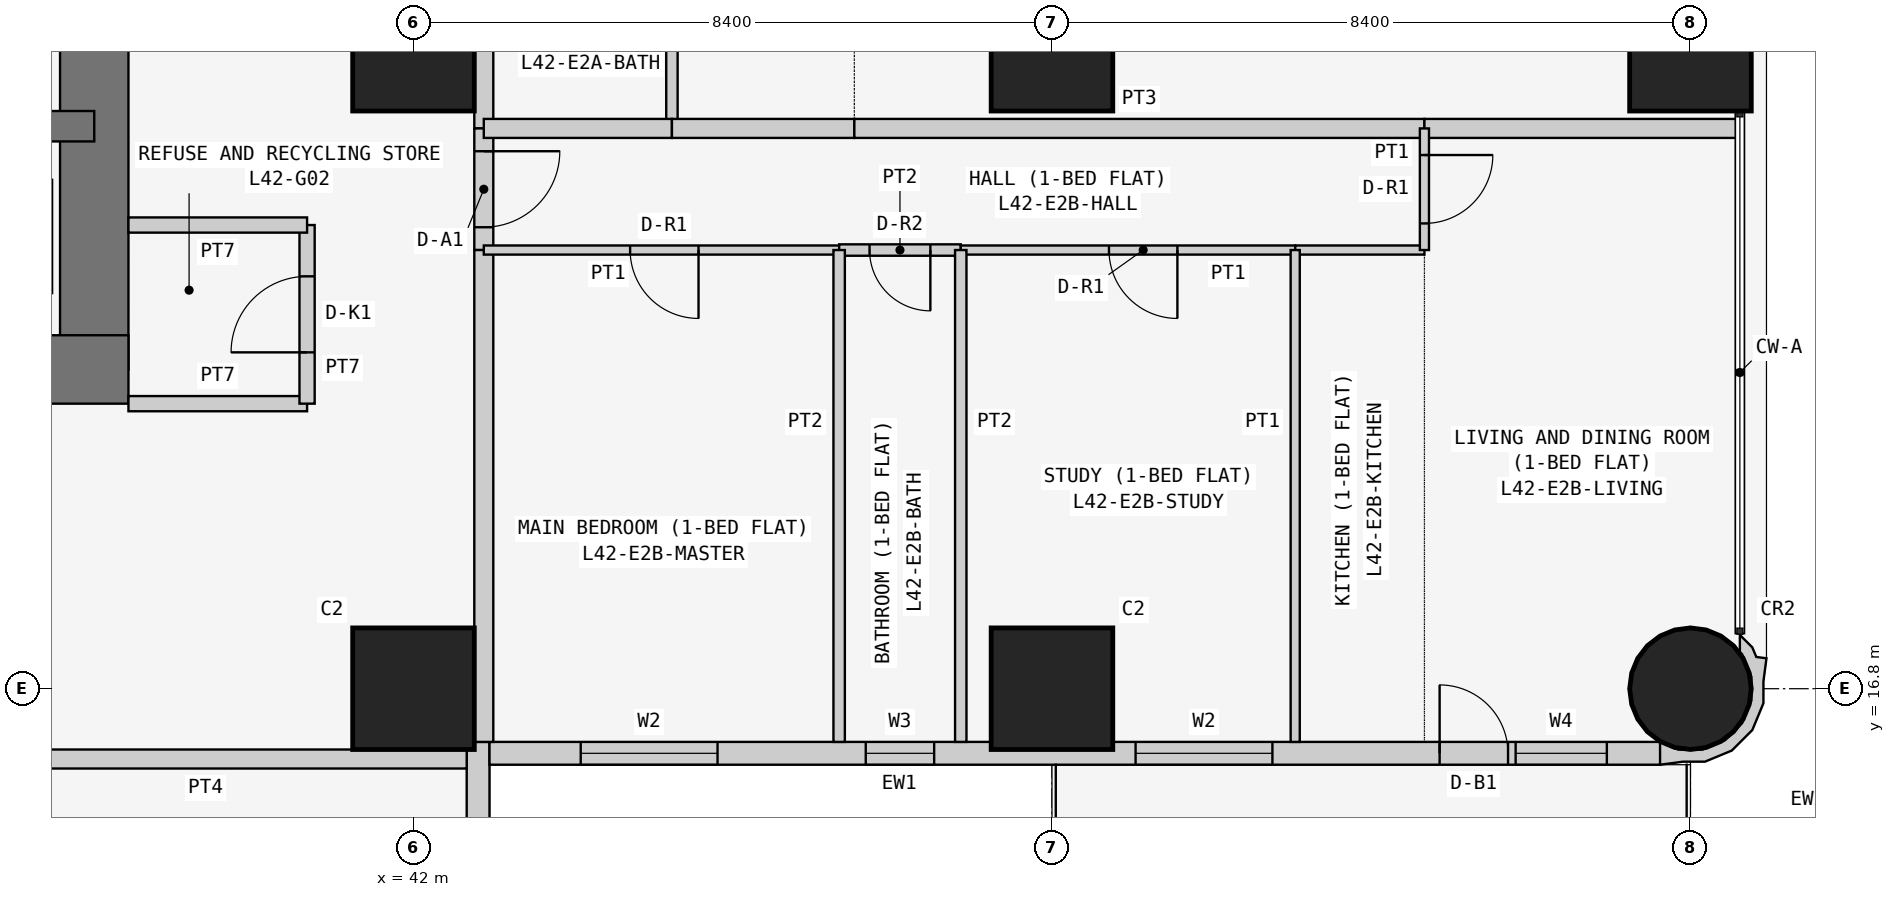
"""IFC4 building model, lengths in metres.
Left out: names, types, materials, properties, quantities, classifications, styles, units other than length and angle.
Written with IfcOpenShell. Run it as: python <this file> out.ifc"""

import sys

from ifc_helpers import new_model, si_unit, direction, frame, frame_2d, origin, origin_2d, place, context, subcontext, project, spatial, polyline, rectangle, circle, outline, extrude, element, fill, save


model = new_model("IFC4")
c1 = context("Model", 3, precision=1e-05, world=origin(), true_north=direction((0.0, 1.0)))
c2 = subcontext(c1, "Body", "Model", "MODEL_VIEW")
j1 = project(units=[si_unit("LENGTHUNIT", "METRE"), si_unit("PLANEANGLEUNIT", "RADIAN")], contexts=[c1])
p1 = place(None, origin())
s1 = spatial("IfcSite", under=j1, at=p1, CompositionType="ELEMENT")
p2 = place(p1, origin())
s2 = spatial("IfcBuilding", under=s1, at=p2, CompositionType="ELEMENT")
p3 = place(p2, frame((0.0, 0.0, 162.9)))
s3 = spatial("IfcBuildingStorey", under=s2, at=p3, CompositionType="ELEMENT", Elevation=162.9)
for number, where, z_axis, x_axis in (
    (1, (42.0, 16.8, 0.0), (0.0, 0.0, 1.0), (1.0, 0.0, 0.0)),
    (2, (42.0, 25.2, 0.0), (0.0, 0.0, 1.0), (1.0, 0.0, 0.0)),
    (3, (50.4, 16.8, 0.0), (0.0, 0.0, 1.0), (1.0, 0.0, 0.0)),
    (4, (50.4, 25.2, 0.0), (0.0, 0.0, 1.0), (1.0, 0.0, 0.0)),
):
    element("IfcColumn", number, at=place(p3, frame(where, z_axis=z_axis, x_axis=x_axis)), inside=s3, PredefinedType="COLUMN", context=c2, shape_type="SweptSolid", body=[
        extrude(rectangle(XDim=1.6, YDim=1.6, at=origin_2d()), origin(), (0.0, 0.0, 1.0), 3.6),
    ])
p4 = place(p3, frame((58.8, 16.8, 0.0), z_axis=(0.0, 0.0, 1.0), x_axis=(1.0, 0.0, 0.0)))
e5 = element("IfcColumn", 5, at=p4, inside=s3, PredefinedType="COLUMN", context=c2, shape_type="SweptSolid", body=[
    extrude(circle(Radius=0.8, at=origin_2d()), origin(), (0.0, 0.0, 1.0), 3.6),
])
p5 = place(p3, frame((58.8, 25.2, 0.0), z_axis=(0.0, 0.0, 1.0), x_axis=(1.0, 0.0, 0.0)))
e6 = element("IfcColumn", 6, at=p5, inside=s3, PredefinedType="COLUMN", context=c2, shape_type="SweptSolid", body=[
    extrude(rectangle(XDim=1.6, YDim=1.6, at=origin_2d()), origin(), (0.0, 0.0, 1.0), 3.6),
])
p6 = place(p3, frame((21.0, 21.0, 0.0), z_axis=(0.0, 0.0, 1.0), x_axis=(1.0, 0.0, 0.0)))
e7 = element("IfcWall", 7, at=p6, inside=s3, PredefinedType="SHEAR", context=c2, shape_type="SweptSolid", body=[
    extrude(rectangle(XDim=17.25, YDim=0.9, at=frame_2d((8.625, 0.0))), origin(), (0.0, 0.0, 1.0), 3.6),
])
p7 = place(p3, frame((37.8, 21.0, 0.0), z_axis=(0.0, 0.0, 1.0), x_axis=(0.0, 1.0, 0.0)))
e8 = element("IfcWall", 8, at=p7, inside=s3, PredefinedType="SHEAR", context=c2, shape_type="SweptSolid", body=[
    extrude(rectangle(XDim=17.25, YDim=0.9, at=frame_2d((8.625, 0.0))), origin(), (0.0, 0.0, 1.0), 3.6),
])
p8 = place(p7, frame((5.2, 0.0, 0.0)))
e9 = element("IfcOpeningElement", 9, at=p8, cuts=e8, PredefinedType="OPENING", context=c2, shape_type="SweptSolid", body=[
    extrude(rectangle(XDim=1.2, YDim=2.1, at=frame_2d((0.6, 1.05))), frame((0.0, 0.46, 0.0), z_axis=(0.0, -1.0, 0.0), x_axis=(1.0, 0.0, 0.0)), (0.0, 0.0, 1.0), 0.92),
])
p9 = place(p3, frame((26.6, 24.2, 0.0), z_axis=(0.0, 0.0, 1.0), x_axis=(1.0, 0.0, 0.0)))
e10 = element("IfcWall", 10, at=p9, inside=s3, PredefinedType="SHEAR", context=c2, shape_type="SweptSolid", body=[
    extrude(rectangle(XDim=11.2, YDim=0.4, at=frame_2d((5.6, 0.0))), origin(), (0.0, 0.0, 1.0), 3.6),
])
p10 = place(p9, frame((0.85, 0.0, 0.0)))
e11 = element("IfcOpeningElement", 11, at=p10, cuts=e10, PredefinedType="OPENING", context=c2, shape_type="SweptSolid", body=[
    extrude(rectangle(XDim=1.1, YDim=2.1, at=frame_2d((0.55, 1.05))), frame((0.0, 0.21, 0.0), z_axis=(0.0, -1.0, 0.0), x_axis=(1.0, 0.0, 0.0)), (0.0, 0.0, 1.0), 0.42),
])
p11 = place(p9, frame((3.65, 0.0, 0.0)))
e12 = element("IfcOpeningElement", 12, at=p11, cuts=e10, PredefinedType="OPENING", context=c2, shape_type="SweptSolid", body=[
    extrude(rectangle(XDim=1.1, YDim=2.1, at=frame_2d((0.55, 1.05))), frame((0.0, 0.21, 0.0), z_axis=(0.0, -1.0, 0.0), x_axis=(1.0, 0.0, 0.0)), (0.0, 0.0, 1.0), 0.42),
])
p12 = place(p3, frame((42.85, 8.8, 0.0), z_axis=(0.0, 0.0, 1.0), x_axis=(0.0, 1.0, 0.0)))
e13 = element("IfcWall", 13, at=p12, inside=s3, PredefinedType="SOLIDWALL", context=c2, shape_type="SweptSolid", body=[
    extrude(rectangle(XDim=7.3, YDim=0.3, at=frame_2d((3.65, 0.0))), origin(), (0.0, 0.0, 1.0), 3.45),
])
p13 = place(p12, frame((3.1, 0.0, 0.9)))
e14 = element("IfcOpeningElement", 14, at=p13, cuts=e13, PredefinedType="OPENING", context=c2, shape_type="SweptSolid", body=[
    extrude(rectangle(XDim=2.4, YDim=1.5, at=frame_2d((1.2, 0.75))), frame((0.0, 0.16, 0.0), z_axis=(0.0, -1.0, 0.0), x_axis=(1.0, 0.0, 0.0)), (0.0, 0.0, 1.0), 0.32),
])
p14 = place(p12, frame((0.75, 0.0, 0.9)))
e15 = element("IfcOpeningElement", 15, at=p14, cuts=e13, PredefinedType="OPENING", context=c2, shape_type="SweptSolid", body=[
    extrude(rectangle(XDim=1.2, YDim=1.5, at=frame_2d((0.6, 0.75))), frame((0.0, 0.16, 0.0), z_axis=(0.0, -1.0, 0.0), x_axis=(1.0, 0.0, 0.0)), (0.0, 0.0, 1.0), 0.32),
])
p15 = place(p3, frame((43.0, 15.95, 0.0), z_axis=(0.0, 0.0, 1.0), x_axis=(1.0, 0.0, 0.0)))
e16 = element("IfcWall", 16, at=p15, inside=s3, PredefinedType="SOLIDWALL", context=c2, shape_type="SweptSolid", body=[
    extrude(rectangle(XDim=15.4, YDim=0.3, at=frame_2d((7.7, 0.0))), origin(), (0.0, 0.0, 1.0), 3.45),
])
p16 = place(p15, frame((1.2, 0.0, 0.9)))
e17 = element("IfcOpeningElement", 17, at=p16, cuts=e16, PredefinedType="OPENING", context=c2, shape_type="SweptSolid", body=[
    extrude(rectangle(XDim=1.8, YDim=1.5, at=frame_2d((0.9, 0.75))), frame((0.0, 0.16, 0.0), z_axis=(0.0, -1.0, 0.0), x_axis=(1.0, 0.0, 0.0)), (0.0, 0.0, 1.0), 0.32),
])
p17 = place(p15, frame((4.95, 0.0, 1.5)))
e18 = element("IfcOpeningElement", 18, at=p17, cuts=e16, PredefinedType="OPENING", context=c2, shape_type="SweptSolid", body=[
    extrude(rectangle(XDim=0.9, YDim=0.7, at=frame_2d((0.45, 0.35))), frame((0.0, 0.16, 0.0), z_axis=(0.0, -1.0, 0.0), x_axis=(1.0, 0.0, 0.0)), (0.0, 0.0, 1.0), 0.32),
])
p18 = place(p15, frame((8.5, 0.0, 0.9)))
e19 = element("IfcOpeningElement", 19, at=p18, cuts=e16, PredefinedType="OPENING", context=c2, shape_type="SweptSolid", body=[
    extrude(rectangle(XDim=1.8, YDim=1.5, at=frame_2d((0.9, 0.75))), frame((0.0, 0.16, 0.0), z_axis=(0.0, -1.0, 0.0), x_axis=(1.0, 0.0, 0.0)), (0.0, 0.0, 1.0), 0.32),
])
p19 = place(p15, frame((12.5, 0.0, 0.0)))
e20 = element("IfcOpeningElement", 20, at=p19, cuts=e16, PredefinedType="OPENING", context=c2, shape_type="SweptSolid", body=[
    extrude(rectangle(XDim=0.9, YDim=2.4, at=frame_2d((0.45, 1.2))), frame((0.0, 0.16, 0.0), z_axis=(0.0, -1.0, 0.0), x_axis=(1.0, 0.0, 0.0)), (0.0, 0.0, 1.0), 0.32),
])
p20 = place(p15, frame((13.5, 0.0, 0.9)))
e21 = element("IfcOpeningElement", 21, at=p20, cuts=e16, PredefinedType="OPENING", context=c2, shape_type="SweptSolid", body=[
    extrude(rectangle(XDim=1.2, YDim=1.5, at=frame_2d((0.6, 0.75))), frame((0.0, 0.16, 0.0), z_axis=(0.0, -1.0, 0.0), x_axis=(1.0, 0.0, 0.0)), (0.0, 0.0, 1.0), 0.32),
])
p21 = place(p3, frame((58.473, 15.983, 0.0), z_axis=(0.0, 0.0, 1.0), x_axis=(0.93923434088, -0.343276641956, 0.0)))
e22 = element("IfcWall", 22, at=p21, inside=s3, PredefinedType="SOLIDWALL", context=c2, shape_type="SweptSolid", body=[
    extrude(outline(polyline([(0.828, 1.599), (0.697, 1.569), (0.604, 1.67), (0.394, 1.767), (0.471, 1.556), (0.508, 1.539), (0.724, 1.304), (0.834, 1.005), (0.82, 0.686), (0.686, 0.397), (0.451, 0.182), (0.152, 0.073), (-0.116, 0.084), (-0.127, 0.078), (-0.146, 0.071), (-0.006, -0.197), (0.266, -0.055), (0.535, 0.044), (0.817, 0.302), (0.978, 0.648), (0.994, 1.03), (0.895, 1.3), (0.828, 1.599)])), origin(), (0.0, 0.0, 1.0), 3.45),
])
p22 = place(p3, frame((38.25, 20.55, 0.0), z_axis=(0.0, 0.0, 1.0), x_axis=(1.0, 0.0, 0.0)))
e23 = element("IfcWall", 23, at=p22, inside=s3, PredefinedType="PARTITIONING", context=c2, shape_type="SweptSolid", body=[
    extrude(rectangle(XDim=2.35, YDim=0.2, at=frame_2d((1.175, 0.0))), origin(), (0.0, 0.0, 1.0), 3.45),
])
p23 = place(p3, frame((40.6, 20.55, 0.0), z_axis=(0.0, 0.0, 1.0), x_axis=(0.0, 1.0, 0.0)))
e24 = element("IfcWall", 24, at=p23, inside=s3, PredefinedType="PARTITIONING", context=c2, shape_type="SweptSolid", body=[
    extrude(rectangle(XDim=2.35, YDim=0.2, at=frame_2d((1.175, 0.0))), origin(), (0.0, 0.0, 1.0), 3.45),
])
p24 = place(p23, frame((0.675, 0.0, 0.0)))
e25 = element("IfcOpeningElement", 25, at=p24, cuts=e24, PredefinedType="OPENING", context=c2, shape_type="SweptSolid", body=[
    extrude(rectangle(XDim=1.0, YDim=2.1, at=frame_2d((0.5, 1.05))), frame((0.0, 0.11, 0.0), z_axis=(0.0, -1.0, 0.0), x_axis=(1.0, 0.0, 0.0)), (0.0, 0.0, 1.0), 0.22),
])
p25 = place(p3, frame((40.6, 22.9, 0.0), z_axis=(0.0, 0.0, 1.0), x_axis=(-1.0, 0.0, 0.0)))
e26 = element("IfcWall", 26, at=p25, inside=s3, PredefinedType="PARTITIONING", context=c2, shape_type="SweptSolid", body=[
    extrude(rectangle(XDim=2.35, YDim=0.2, at=frame_2d((1.175, 0.0))), origin(), (0.0, 0.0, 1.0), 3.45),
])
p26 = place(p3, frame((42.925, 26.8, 0.0), z_axis=(0.0, 0.0, 1.0), x_axis=(0.0, -1.0, 0.0)))
e27 = element("IfcWall", 27, at=p26, inside=s3, PredefinedType="PARTITIONING", context=c2, shape_type="SweptSolid", body=[
    extrude(rectangle(XDim=2.629, YDim=0.25, at=frame_2d((1.314, 0.0))), origin(), (0.0, 0.0, 1.0), 3.45),
])
p27 = place(p3, frame((42.925, 24.171, 0.0), z_axis=(0.0, 0.0, 1.0), x_axis=(0.0, -1.0, 0.0)))
e28 = element("IfcWall", 28, at=p27, inside=s3, PredefinedType="PARTITIONING", context=c2, shape_type="SweptSolid", body=[
    extrude(rectangle(XDim=1.6, YDim=0.25, at=frame_2d((0.8, 0.0))), origin(), (0.0, 0.0, 1.0), 3.45),
])
p28 = place(p27, frame((0.3, 0.0, 0.0)))
e29 = element("IfcOpeningElement", 29, at=p28, cuts=e28, PredefinedType="OPENING", context=c2, shape_type="SweptSolid", body=[
    extrude(rectangle(XDim=1.0, YDim=2.1, at=frame_2d((0.5, 1.05))), frame((0.0, 0.135, 0.0), z_axis=(0.0, -1.0, 0.0), x_axis=(1.0, 0.0, 0.0)), (0.0, 0.0, 1.0), 0.27),
])
p29 = place(p3, frame((42.925, 22.571, 0.0), z_axis=(0.0, 0.0, 1.0), x_axis=(0.0, -1.0, 0.0)))
e30 = element("IfcWall", 30, at=p29, inside=s3, PredefinedType="PARTITIONING", context=c2, shape_type="SweptSolid", body=[
    extrude(rectangle(XDim=6.471, YDim=0.25, at=frame_2d((3.235, 0.0))), origin(), (0.0, 0.0, 1.0), 3.45),
])
p30 = place(p3, frame((42.7, 15.875, 0.0), z_axis=(0.0, 0.0, 1.0), x_axis=(-1.0, 0.0, 0.0)))
e31 = element("IfcWall", 31, at=p30, inside=s3, PredefinedType="PARTITIONING", context=c2, shape_type="SweptSolid", body=[
    extrude(rectangle(XDim=6.871, YDim=0.25, at=frame_2d((3.436, 0.0))), origin(), (0.0, 0.0, 1.0), 3.45),
])
p31 = place(p3, frame((45.4, 26.8, 0.0), z_axis=(0.0, 0.0, 1.0), x_axis=(0.0, -1.0, 0.0)))
e32 = element("IfcWall", 32, at=p31, inside=s3, PredefinedType="PARTITIONING", context=c2, shape_type="SweptSolid", body=[
    extrude(rectangle(XDim=2.629, YDim=0.15, at=frame_2d((1.314, 0.0))), origin(), (0.0, 0.0, 1.0), 3.45),
])
p32 = place(p3, frame((45.4, 24.171, 0.0), z_axis=(0.0, 0.0, 1.0), x_axis=(-1.0, 0.0, 0.0)))
e33 = element("IfcWall", 33, at=p32, inside=s3, PredefinedType="PARTITIONING", context=c2, shape_type="SweptSolid", body=[
    extrude(rectangle(XDim=2.475, YDim=0.25, at=frame_2d((1.237, 0.0))), origin(), (0.0, 0.0, 1.0), 3.45),
])
p33 = place(p3, frame((47.8, 24.171, 0.0), z_axis=(0.0, 0.0, 1.0), x_axis=(-1.0, 0.0, 0.0)))
e34 = element("IfcWall", 34, at=p33, inside=s3, PredefinedType="PARTITIONING", context=c2, shape_type="SweptSolid", body=[
    extrude(rectangle(XDim=2.4, YDim=0.25, at=frame_2d((1.2, 0.0))), origin(), (0.0, 0.0, 1.0), 3.45),
])
p34 = place(p3, frame((55.3, 24.171, 0.0), z_axis=(0.0, 0.0, 1.0), x_axis=(-1.0, 0.0, 0.0)))
e35 = element("IfcWall", 35, at=p34, inside=s3, PredefinedType="PARTITIONING", context=c2, shape_type="SweptSolid", body=[
    extrude(rectangle(XDim=7.5, YDim=0.25, at=frame_2d((3.75, 0.0))), origin(), (0.0, 0.0, 1.0), 3.45),
])
p35 = place(p3, frame((59.45, 24.171, 0.0), z_axis=(0.0, 0.0, 1.0), x_axis=(-1.0, 0.0, 0.0)))
e36 = element("IfcWall", 36, at=p35, inside=s3, PredefinedType="PARTITIONING", context=c2, shape_type="SweptSolid", body=[
    extrude(rectangle(XDim=4.15, YDim=0.25, at=frame_2d((2.075, 0.0))), origin(), (0.0, 0.0, 1.0), 3.45),
])
p36 = place(p3, frame((47.6, 22.571, 0.0), z_axis=(0.0, 0.0, 1.0), x_axis=(-1.0, 0.0, 0.0)))
e37 = element("IfcWall", 37, at=p36, inside=s3, PredefinedType="PARTITIONING", context=c2, shape_type="SweptSolid", body=[
    extrude(rectangle(XDim=4.675, YDim=0.12, at=frame_2d((2.337, 0.0))), origin(), (0.0, 0.0, 1.0), 3.45),
])
p37 = place(p36, frame((1.85, 0.0, 0.0)))
e38 = element("IfcOpeningElement", 38, at=p37, cuts=e37, PredefinedType="OPENING", context=c2, shape_type="SweptSolid", body=[
    extrude(rectangle(XDim=0.9, YDim=2.1, at=frame_2d((0.45, 1.05))), frame((0.0, 0.07, 0.0), z_axis=(0.0, -1.0, 0.0), x_axis=(1.0, 0.0, 0.0)), (0.0, 0.0, 1.0), 0.14),
])
p38 = place(p3, frame((49.2, 22.571, 0.0), z_axis=(0.0, 0.0, 1.0), x_axis=(-1.0, 0.0, 0.0)))
e39 = element("IfcWall", 39, at=p38, inside=s3, PredefinedType="PARTITIONING", context=c2, shape_type="SweptSolid", body=[
    extrude(rectangle(XDim=1.6, YDim=0.15, at=frame_2d((0.8, 0.0))), origin(), (0.0, 0.0, 1.0), 3.45),
])
p39 = place(p38, frame((0.4, 0.0, 0.0)))
e40 = element("IfcOpeningElement", 40, at=p39, cuts=e39, PredefinedType="OPENING", context=c2, shape_type="SweptSolid", body=[
    extrude(rectangle(XDim=0.8, YDim=2.1, at=frame_2d((0.4, 1.05))), frame((0.0, 0.085, 0.0), z_axis=(0.0, -1.0, 0.0), x_axis=(1.0, 0.0, 0.0)), (0.0, 0.0, 1.0), 0.17),
])
p40 = place(p3, frame((53.6, 22.571, 0.0), z_axis=(0.0, 0.0, 1.0), x_axis=(-1.0, 0.0, 0.0)))
e41 = element("IfcWall", 41, at=p40, inside=s3, PredefinedType="PARTITIONING", context=c2, shape_type="SweptSolid", body=[
    extrude(rectangle(XDim=4.4, YDim=0.12, at=frame_2d((2.2, 0.0))), origin(), (0.0, 0.0, 1.0), 3.45),
])
p41 = place(p40, frame((1.55, 0.0, 0.0)))
e42 = element("IfcOpeningElement", 42, at=p41, cuts=e41, PredefinedType="OPENING", context=c2, shape_type="SweptSolid", body=[
    extrude(rectangle(XDim=0.9, YDim=2.1, at=frame_2d((0.45, 1.05))), frame((0.0, 0.07, 0.0), z_axis=(0.0, -1.0, 0.0), x_axis=(1.0, 0.0, 0.0)), (0.0, 0.0, 1.0), 0.14),
])
p42 = place(p3, frame((55.3, 22.571, 0.0), z_axis=(0.0, 0.0, 1.0), x_axis=(-1.0, 0.0, 0.0)))
e43 = element("IfcWall", 43, at=p42, inside=s3, PredefinedType="PARTITIONING", context=c2, shape_type="SweptSolid", body=[
    extrude(rectangle(XDim=1.7, YDim=0.12, at=frame_2d((0.85, 0.0))), origin(), (0.0, 0.0, 1.0), 3.45),
])
p43 = place(p3, frame((55.3, 24.171, 0.0), z_axis=(0.0, 0.0, 1.0), x_axis=(0.0, -1.0, 0.0)))
e44 = element("IfcWall", 44, at=p43, inside=s3, PredefinedType="PARTITIONING", context=c2, shape_type="SweptSolid", body=[
    extrude(rectangle(XDim=1.6, YDim=0.12, at=frame_2d((0.8, 0.0))), origin(), (0.0, 0.0, 1.0), 3.45),
])
p44 = place(p43, frame((0.35, 0.0, 0.0)))
e45 = element("IfcOpeningElement", 45, at=p44, cuts=e44, PredefinedType="OPENING", context=c2, shape_type="SweptSolid", body=[
    extrude(rectangle(XDim=0.9, YDim=2.1, at=frame_2d((0.45, 1.05))), frame((0.0, 0.07, 0.0), z_axis=(0.0, -1.0, 0.0), x_axis=(1.0, 0.0, 0.0)), (0.0, 0.0, 1.0), 0.14),
])
for number, where, z_axis, x_axis in (
    (46, (47.6, 22.571, 0.0), (0.0, 0.0, 1.0), (0.0, -1.0, 0.0)),
    (47, (49.2, 22.571, 0.0), (0.0, 0.0, 1.0), (0.0, -1.0, 0.0)),
):
    element("IfcWall", number, at=place(p3, frame(where, z_axis=z_axis, x_axis=x_axis)), inside=s3, PredefinedType="PARTITIONING", context=c2, shape_type="SweptSolid", body=[
        extrude(rectangle(XDim=6.471, YDim=0.15, at=frame_2d((3.235, 0.0))), origin(), (0.0, 0.0, 1.0), 3.45),
    ])
p45 = place(p3, frame((53.6, 22.571, 0.0), z_axis=(0.0, 0.0, 1.0), x_axis=(0.0, -1.0, 0.0)))
e48 = element("IfcWall", 48, at=p45, inside=s3, PredefinedType="PARTITIONING", context=c2, shape_type="SweptSolid", body=[
    extrude(rectangle(XDim=6.471, YDim=0.12, at=frame_2d((3.235, 0.0))), origin(), (0.0, 0.0, 1.0), 3.45),
])
p46 = place(p16, origin())
e49 = element("IfcWindow", 49, at=p46, inside=s3, PartitioningType="SINGLE_PANEL", PredefinedType="WINDOW", context=c2, shape_type="SweptSolid", body=[
    extrude(rectangle(XDim=1.8, YDim=1.5, at=frame_2d((0.9, 0.75))), frame((0.0, 0.03, 0.0), z_axis=(0.0, -1.0, 0.0), x_axis=(1.0, 0.0, 0.0)), (0.0, 0.0, 1.0), 0.06),
])
fill(e17, e49)
p47 = place(p17, origin())
e50 = element("IfcWindow", 50, at=p47, inside=s3, PartitioningType="SINGLE_PANEL", PredefinedType="WINDOW", context=c2, shape_type="SweptSolid", body=[
    extrude(rectangle(XDim=0.9, YDim=0.7, at=frame_2d((0.45, 0.35))), frame((0.0, 0.03, 0.0), z_axis=(0.0, -1.0, 0.0), x_axis=(1.0, 0.0, 0.0)), (0.0, 0.0, 1.0), 0.06),
])
fill(e18, e50)
p48 = place(p18, origin())
e51 = element("IfcWindow", 51, at=p48, inside=s3, PartitioningType="SINGLE_PANEL", PredefinedType="WINDOW", context=c2, shape_type="SweptSolid", body=[
    extrude(rectangle(XDim=1.8, YDim=1.5, at=frame_2d((0.9, 0.75))), frame((0.0, 0.03, 0.0), z_axis=(0.0, -1.0, 0.0), x_axis=(1.0, 0.0, 0.0)), (0.0, 0.0, 1.0), 0.06),
])
fill(e19, e51)
p49 = place(p19, origin())
e52 = element("IfcDoor", 52, at=p49, inside=s3, OperationType="SINGLE_SWING_LEFT", PredefinedType="DOOR", context=c2, shape_type="SweptSolid", body=[
    extrude(rectangle(XDim=0.9, YDim=2.4, at=frame_2d((0.45, 1.2))), frame((0.0, 0.025, 0.0), z_axis=(0.0, -1.0, 0.0), x_axis=(1.0, 0.0, 0.0)), (0.0, 0.0, 1.0), 0.05),
])
fill(e20, e52)
p50 = place(p20, origin())
e53 = element("IfcWindow", 53, at=p50, inside=s3, PartitioningType="SINGLE_PANEL", PredefinedType="WINDOW", context=c2, shape_type="SweptSolid", body=[
    extrude(rectangle(XDim=1.2, YDim=1.5, at=frame_2d((0.6, 0.75))), frame((0.0, 0.03, 0.0), z_axis=(0.0, -1.0, 0.0), x_axis=(1.0, 0.0, 0.0)), (0.0, 0.0, 1.0), 0.06),
])
fill(e21, e53)
p51 = place(p24, origin())
e54 = element("IfcDoor", 54, at=p51, inside=s3, OperationType="SINGLE_SWING_LEFT", PredefinedType="DOOR", context=c2, shape_type="SweptSolid", body=[
    extrude(rectangle(XDim=1.0, YDim=2.1, at=frame_2d((0.5, 1.05))), frame((0.0, 0.025, 0.0), z_axis=(0.0, -1.0, 0.0), x_axis=(1.0, 0.0, 0.0)), (0.0, 0.0, 1.0), 0.05),
])
fill(e25, e54)
p52 = place(p28, origin())
e55 = element("IfcDoor", 55, at=p52, inside=s3, OperationType="SINGLE_SWING_LEFT", PredefinedType="DOOR", context=c2, shape_type="SweptSolid", body=[
    extrude(rectangle(XDim=1.0, YDim=2.1, at=frame_2d((0.5, 1.05))), frame((0.0, 0.025, 0.0), z_axis=(0.0, -1.0, 0.0), x_axis=(1.0, 0.0, 0.0)), (0.0, 0.0, 1.0), 0.05),
])
fill(e29, e55)
p53 = place(p37, origin())
e56 = element("IfcDoor", 56, at=p53, inside=s3, OperationType="SINGLE_SWING_LEFT", PredefinedType="DOOR", context=c2, shape_type="SweptSolid", body=[
    extrude(rectangle(XDim=0.9, YDim=2.1, at=frame_2d((0.45, 1.05))), frame((0.0, 0.025, 0.0), z_axis=(0.0, -1.0, 0.0), x_axis=(1.0, 0.0, 0.0)), (0.0, 0.0, 1.0), 0.05),
])
fill(e38, e56)
p54 = place(p39, origin())
e57 = element("IfcDoor", 57, at=p54, inside=s3, OperationType="SINGLE_SWING_LEFT", PredefinedType="DOOR", context=c2, shape_type="SweptSolid", body=[
    extrude(rectangle(XDim=0.8, YDim=2.1, at=frame_2d((0.4, 1.05))), frame((0.0, 0.025, 0.0), z_axis=(0.0, -1.0, 0.0), x_axis=(1.0, 0.0, 0.0)), (0.0, 0.0, 1.0), 0.05),
])
fill(e40, e57)
p55 = place(p41, origin())
e58 = element("IfcDoor", 58, at=p55, inside=s3, OperationType="SINGLE_SWING_LEFT", PredefinedType="DOOR", context=c2, shape_type="SweptSolid", body=[
    extrude(rectangle(XDim=0.9, YDim=2.1, at=frame_2d((0.45, 1.05))), frame((0.0, 0.025, 0.0), z_axis=(0.0, -1.0, 0.0), x_axis=(1.0, 0.0, 0.0)), (0.0, 0.0, 1.0), 0.05),
])
fill(e42, e58)
p56 = place(p44, origin())
e59 = element("IfcDoor", 59, at=p56, inside=s3, OperationType="SINGLE_SWING_LEFT", PredefinedType="DOOR", context=c2, shape_type="SweptSolid", body=[
    extrude(rectangle(XDim=0.9, YDim=2.1, at=frame_2d((0.45, 1.05))), frame((0.0, 0.025, 0.0), z_axis=(0.0, -1.0, 0.0), x_axis=(1.0, 0.0, 0.0)), (0.0, 0.0, 1.0), 0.05),
])
fill(e45, e59)
save(model, sys.argv[1])
